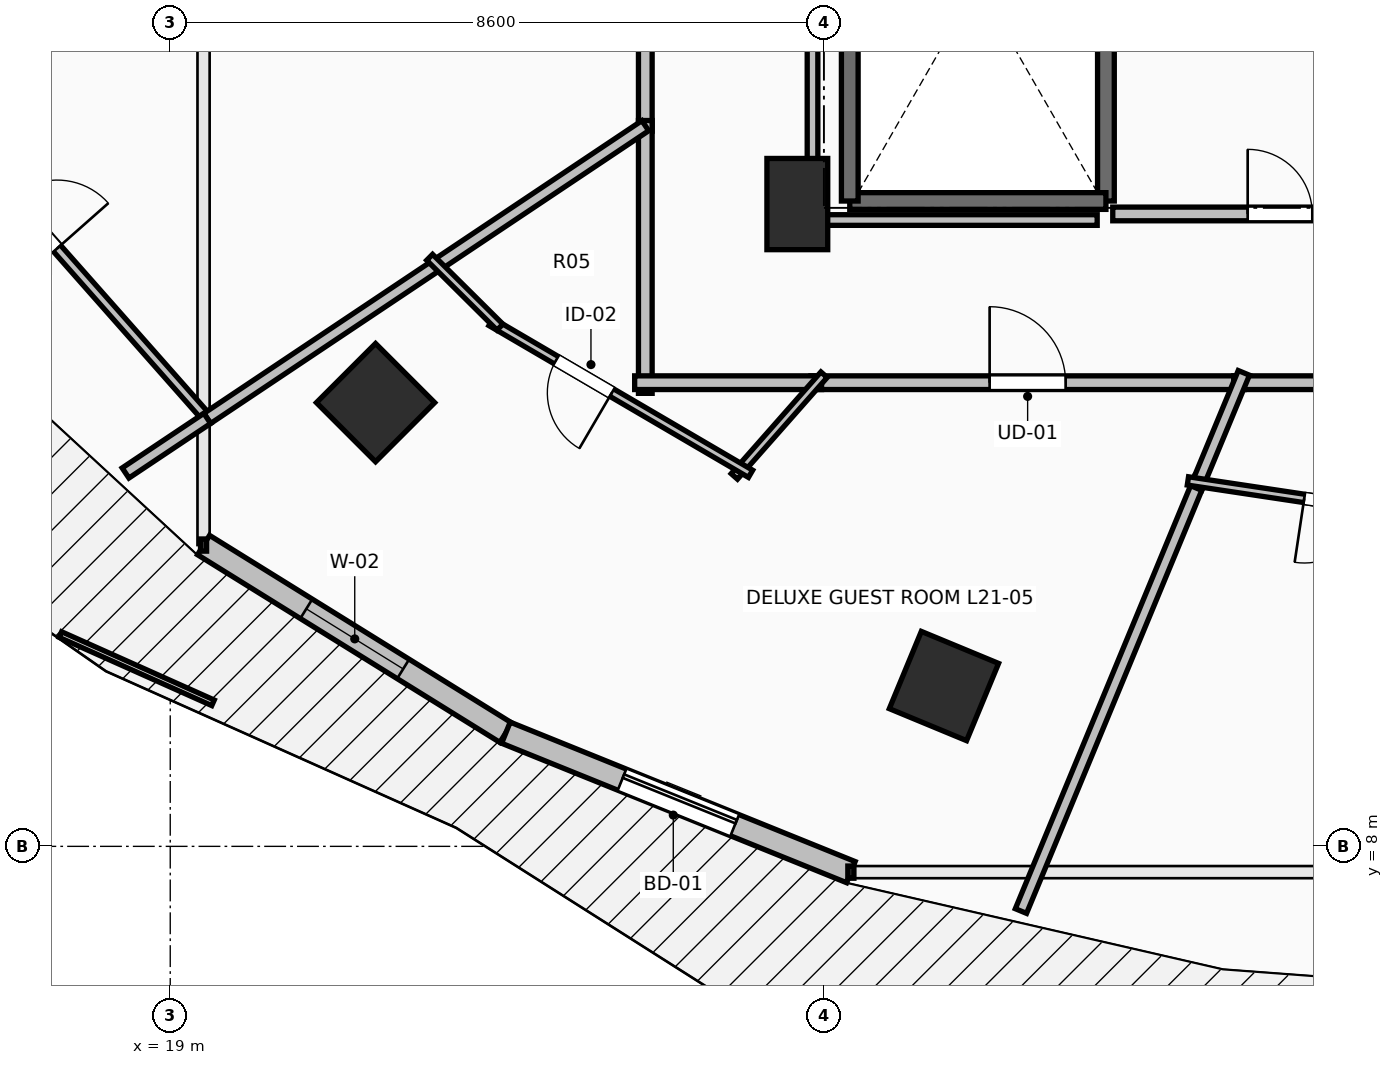
"""IFC4 building model, lengths in metres.
Left out: names, types, materials, properties, quantities, classifications, styles, units other than length and angle.
Written with IfcOpenShell. Run it as: python <this file> out.ifc"""

import sys

from ifc_helpers import new_model, si_unit, direction, frame, frame_2d, origin, origin_2d, place, context, subcontext, project, spatial, rectangle, extrude, element, fill, save


model = new_model("IFC4")
c1 = context("Model", 3, precision=1e-05, world=origin(), true_north=direction((0.0, 1.0)))
c2 = subcontext(c1, "Body", "Model", "MODEL_VIEW")
j1 = project(units=[si_unit("LENGTHUNIT", "METRE"), si_unit("PLANEANGLEUNIT", "RADIAN")], contexts=[c1])
p1 = place(None, origin())
s1 = spatial("IfcSite", under=j1, at=p1, CompositionType="ELEMENT")
p2 = place(p1, origin())
s2 = spatial("IfcBuilding", under=s1, at=p2, CompositionType="ELEMENT")
p3 = place(p2, frame((0.0, 0.0, 82.3)))
s3 = spatial("IfcBuildingStorey", under=s2, at=p3, CompositionType="ELEMENT", Elevation=82.3)
for number, where, z_axis, x_axis in (
    (1, (21.701, 13.838, 0.0), (0.0, 0.0, 1.0), (-0.707, -0.707, 0.0)),
    (2, (29.179, 10.109, 0.0), (0.0, 0.0, 1.0), (-0.383, -0.924, 0.0)),
):
    element("IfcColumn", number, at=place(p3, frame(where, z_axis=z_axis, x_axis=x_axis)), inside=s3, PredefinedType="COLUMN", context=c2, shape_type="SweptSolid", body=[
        extrude(rectangle(XDim=1.1, YDim=1.1, at=origin_2d()), origin(), (0.0, 0.0, 1.0), 3.5),
    ])
p4 = place(p3, frame((27.25, 16.45, 0.0), z_axis=(0.0, 0.0, 1.0), x_axis=(1.0, 0.0, 0.0)))
e3 = element("IfcColumn", 3, at=p4, inside=s3, PredefinedType="PILASTER", context=c2, shape_type="SweptSolid", body=[
    extrude(rectangle(XDim=0.8, YDim=1.2, at=origin_2d()), origin(), (0.0, 0.0, 1.0), 3.5),
])
p5 = place(p3, frame((19.438, 11.964, 0.0), z_axis=(0.0, 0.0, 1.0), x_axis=(0.849684479743, -0.527291461038, 0.0)))
e4 = element("IfcWall", 4, at=p5, inside=s3, PredefinedType="STANDARD", context=c2, shape_type="SweptSolid", body=[
    extrude(rectangle(XDim=4.681, YDim=0.3, at=frame_2d((2.341, 0.0))), origin(), (0.0, 0.0, 1.0), 3.24),
])
p6 = place(p5, frame((1.591, 0.0, 0.85)))
e5 = element("IfcOpeningElement", 5, at=p6, cuts=e4, PredefinedType="OPENING", context=c2, shape_type="SweptSolid", body=[
    extrude(rectangle(XDim=1.5, YDim=2.19, at=frame_2d((0.75, 1.095))), frame((0.0, 0.165, 0.0), z_axis=(0.0, -1.0, 0.0), x_axis=(1.0, 0.0, 0.0)), (0.0, 0.0, 1.0), 0.33),
])
p7 = place(p3, frame((23.416, 9.495, 0.0), z_axis=(0.0, 0.0, 1.0), x_axis=(0.927122233109, -0.374759075775, 0.0)))
e6 = element("IfcWall", 6, at=p7, inside=s3, PredefinedType="STANDARD", context=c2, shape_type="SweptSolid", body=[
    extrude(rectangle(XDim=4.895, YDim=0.3, at=frame_2d((2.448, 0.0))), origin(), (0.0, 0.0, 1.0), 3.24),
])
p8 = place(p7, frame((1.647, 0.0, 0.0)))
e7 = element("IfcOpeningElement", 7, at=p8, cuts=e6, PredefinedType="OPENING", context=c2, shape_type="SweptSolid", body=[
    extrude(rectangle(XDim=1.6, YDim=2.3, at=frame_2d((0.8, 1.15))), frame((0.0, 0.165, 0.0), z_axis=(0.0, -1.0, 0.0), x_axis=(1.0, 0.0, 0.0)), (0.0, 0.0, 1.0), 0.33),
])
p9 = place(p3, frame((31.31, 23.91, 0.0), z_axis=(0.0, 0.0, 1.0), x_axis=(0.0, -1.0, 0.0)))
e8 = element("IfcWall", 8, at=p9, inside=s3, PredefinedType="SOLIDWALL", context=c2, shape_type="SweptSolid", body=[
    extrude(rectangle(XDim=7.42, YDim=0.22, at=frame_2d((3.71, 0.0))), origin(), (0.0, 0.0, 1.0), 3.24),
])
p10 = place(p3, frame((31.31, 16.49, 0.0), z_axis=(0.0, 0.0, 1.0), x_axis=(-1.0, 0.0, 0.0)))
e9 = element("IfcWall", 9, at=p10, inside=s3, PredefinedType="SOLIDWALL", context=c2, shape_type="SweptSolid", body=[
    extrude(rectangle(XDim=3.37, YDim=0.22, at=frame_2d((1.685, 0.0))), origin(), (0.0, 0.0, 1.0), 3.24),
])
p11 = place(p3, frame((27.94, 16.49, 0.0), z_axis=(0.0, 0.0, 1.0), x_axis=(0.0, 1.0, 0.0)))
e10 = element("IfcWall", 10, at=p11, inside=s3, PredefinedType="SOLIDWALL", context=c2, shape_type="SweptSolid", body=[
    extrude(rectangle(XDim=7.42, YDim=0.22, at=frame_2d((3.71, 0.0))), origin(), (0.0, 0.0, 1.0), 3.24),
])
p12 = place(p3, frame((31.4, 16.32, 0.0), z_axis=(0.0, 0.0, 1.0), x_axis=(1.0, 0.0, 0.0)))
e11 = element("IfcWall", 11, at=p12, inside=s3, PredefinedType="PARTITIONING", context=c2, shape_type="SweptSolid", body=[
    extrude(rectangle(XDim=4.4, YDim=0.18, at=frame_2d((2.2, 0.0))), origin(), (0.0, 0.0, 1.0), 3.24),
])
p13 = place(p12, frame((1.775, 0.0, 0.0)))
e12 = element("IfcOpeningElement", 12, at=p13, cuts=e11, PredefinedType="OPENING", context=c2, shape_type="SweptSolid", body=[
    extrude(rectangle(XDim=0.85, YDim=2.1, at=frame_2d((0.425, 1.05))), frame((0.0, 0.105, 0.0), z_axis=(0.0, -1.0, 0.0), x_axis=(1.0, 0.0, 0.0)), (0.0, 0.0, 1.0), 0.21),
])
p14 = place(p3, frame((25.25, 24.754, 0.0), z_axis=(0.0, 0.0, 1.0), x_axis=(0.0, -1.0, 0.0)))
e13 = element("IfcWall", 13, at=p14, inside=s3, PredefinedType="PARTITIONING", context=c2, shape_type="SweptSolid", body=[
    extrude(rectangle(XDim=7.345, YDim=0.18, at=frame_2d((3.672, 0.0))), origin(), (0.0, 0.0, 1.0), 3.24),
])
p15 = place(p14, frame((3.147, 0.0, 0.0)))
e14 = element("IfcOpeningElement", 14, at=p15, cuts=e13, PredefinedType="OPENING", context=c2, shape_type="SweptSolid", body=[
    extrude(rectangle(XDim=1.05, YDim=2.2, at=frame_2d((0.525, 1.1))), frame((0.0, 0.105, 0.0), z_axis=(0.0, -1.0, 0.0), x_axis=(1.0, 0.0, 0.0)), (0.0, 0.0, 1.0), 0.21),
])
p16 = place(p3, frame((27.429, 14.1, 0.0), z_axis=(0.0, 0.0, 1.0), x_axis=(1.0, 0.0, 0.0)))
e15 = element("IfcWall", 15, at=p16, inside=s3, PredefinedType="PARTITIONING", context=c2, shape_type="SweptSolid", body=[
    extrude(rectangle(XDim=5.702, YDim=0.18, at=frame_2d((2.851, 0.0))), origin(), (0.0, 0.0, 1.0), 2.432),
])
p17 = place(p16, frame((2.351, 0.0, 0.0)))
e16 = element("IfcOpeningElement", 16, at=p17, cuts=e15, PredefinedType="OPENING", context=c2, shape_type="SweptSolid", body=[
    extrude(rectangle(XDim=1.0, YDim=2.15, at=frame_2d((0.5, 1.075))), frame((0.0, 0.105, 0.0), z_axis=(0.0, -1.0, 0.0), x_axis=(1.0, 0.0, 0.0)), (0.0, 0.0, 1.0), 0.21),
])
p18 = place(p3, frame((25.25, 17.549, 0.0), z_axis=(0.0, 0.0, 1.0), x_axis=(0.0, -1.0, 0.0)))
e17 = element("IfcWall", 17, at=p18, inside=s3, PredefinedType="PARTITIONING", context=c2, shape_type="SweptSolid", body=[
    extrude(rectangle(XDim=3.589, YDim=0.18, at=frame_2d((1.794, 0.0))), origin(), (0.0, 0.0, 1.0), 2.432),
])
p19 = place(p3, frame((25.11, 14.1, 0.0), z_axis=(0.0, 0.0, 1.0), x_axis=(1.0, 0.0, 0.0)))
e18 = element("IfcWall", 18, at=p19, inside=s3, PredefinedType="PARTITIONING", context=c2, shape_type="SweptSolid", body=[
    extrude(rectangle(XDim=2.459, YDim=0.18, at=frame_2d((1.229, 0.0))), origin(), (0.0, 0.0, 1.0), 2.874),
])
p20 = place(p3, frame((32.991, 14.1, 0.0), z_axis=(0.0, 0.0, 1.0), x_axis=(1.0, 0.0, 0.0)))
e19 = element("IfcWall", 19, at=p20, inside=s3, PredefinedType="PARTITIONING", context=c2, shape_type="SweptSolid", body=[
    extrude(rectangle(XDim=3.49, YDim=0.18, at=frame_2d((1.745, 0.0))), origin(), (0.0, 0.0, 1.0), 2.922),
])
p21 = place(p3, frame((14.94, 18.776, 0.0), z_axis=(0.0, 0.0, 1.0), x_axis=(0.662156478246, -0.749365597233, 0.0)))
e20 = element("IfcWall", 20, at=p21, inside=s3, PredefinedType="PARTITIONING", context=c2, shape_type="SweptSolid", body=[
    extrude(rectangle(XDim=6.867, YDim=0.125, at=frame_2d((3.434, 0.0))), origin(), (0.0, 0.0, 1.0), 3.24),
])
p22 = place(p21, frame((2.983, 0.0, 0.0)))
e21 = element("IfcOpeningElement", 21, at=p22, cuts=e20, PredefinedType="OPENING", context=c2, shape_type="SweptSolid", body=[
    extrude(rectangle(XDim=0.9, YDim=2.1, at=frame_2d((0.45, 1.05))), frame((0.0, 0.077, 0.0), z_axis=(0.0, -1.0, 0.0), x_axis=(1.0, 0.0, 0.0)), (0.0, 0.0, 1.0), 0.155),
])
p23 = place(p3, frame((19.487, 13.63, 0.0), z_axis=(0.0, 0.0, 1.0), x_axis=(0.831442874018, 0.555610247607, 0.0)))
e22 = element("IfcWall", 22, at=p23, inside=s3, PredefinedType="PARTITIONING", context=c2, shape_type="SweptSolid", body=[
    extrude(rectangle(XDim=6.931, YDim=0.16, at=frame_2d((3.466, 0.0))), origin(), (0.0, 0.0, 1.0), 2.432),
])
p24 = place(p3, frame((18.412, 12.912, 0.0), z_axis=(0.0, 0.0, 1.0), x_axis=(0.831643249848, 0.555310278118, 0.0)))
e23 = element("IfcWall", 23, at=p24, inside=s3, PredefinedType="PARTITIONING", context=c2, shape_type="SweptSolid", body=[
    extrude(rectangle(XDim=1.292, YDim=0.16, at=frame_2d((0.646, 0.0))), origin(), (0.0, 0.0, 1.0), 3.24),
])
p25 = place(p3, frame((27.602, 14.205, 0.0), z_axis=(0.0, 0.0, 1.0), x_axis=(-0.661454172329, -0.749985585134, 0.0)))
e24 = element("IfcWall", 24, at=p25, inside=s3, PredefinedType="PARTITIONING", context=c2, shape_type="SweptSolid", body=[
    extrude(rectangle(XDim=1.784, YDim=0.11, at=frame_2d((0.892, 0.0))), origin(), (0.0, 0.0, 1.0), 2.874),
])
p26 = place(p3, frame((26.635, 12.901, 0.0), z_axis=(0.0, 0.0, 1.0), x_axis=(-0.863173900656, 0.504906741117, 0.0)))
e25 = element("IfcWall", 25, at=p26, inside=s3, PredefinedType="PARTITIONING", context=c2, shape_type="SweptSolid", body=[
    extrude(rectangle(XDim=3.956, YDim=0.11, at=frame_2d((1.978, 0.0))), origin(), (0.0, 0.0, 1.0), 2.432),
])
p27 = place(p26, frame((2.113, 0.0, 0.0)))
e26 = element("IfcOpeningElement", 26, at=p27, cuts=e25, PredefinedType="OPENING", context=c2, shape_type="SweptSolid", body=[
    extrude(rectangle(XDim=0.85, YDim=2.1, at=frame_2d((0.425, 1.05))), frame((0.0, 0.07, 0.0), z_axis=(0.0, -1.0, 0.0), x_axis=(1.0, 0.0, 0.0)), (0.0, 0.0, 1.0), 0.14),
])
p28 = place(p3, frame((23.338, 14.831, 0.0), z_axis=(0.0, 0.0, 1.0), x_axis=(-0.709817225963, 0.70438590682, 0.0)))
e27 = element("IfcWall", 27, at=p28, inside=s3, PredefinedType="PARTITIONING", context=c2, shape_type="SweptSolid", body=[
    extrude(rectangle(XDim=1.303, YDim=0.11, at=frame_2d((0.652, 0.0))), origin(), (0.0, 0.0, 1.0), 2.432),
])
p29 = place(p3, frame((30.192, 7.149, 0.0), z_axis=(0.0, 0.0, 1.0), x_axis=(0.382705075352, 0.923870567395, 0.0)))
e28 = element("IfcWall", 28, at=p29, inside=s3, PredefinedType="PARTITIONING", context=c2, shape_type="SweptSolid", body=[
    extrude(rectangle(XDim=6.164, YDim=0.16, at=frame_2d((3.082, 0.0))), origin(), (0.0, 0.0, 1.0), 2.677),
])
p30 = place(p3, frame((32.497, 12.715, 0.0), z_axis=(0.0, 0.0, 1.0), x_axis=(0.382891039503, 0.923793511489, 0.0)))
e29 = element("IfcWall", 29, at=p30, inside=s3, PredefinedType="PARTITIONING", context=c2, shape_type="SweptSolid", body=[
    extrude(rectangle(XDim=1.639, YDim=0.16, at=frame_2d((0.82, 0.0))), origin(), (0.0, 0.0, 1.0), 2.922),
])
p31 = place(p3, frame((36.29, 12.221, 0.0), z_axis=(0.0, 0.0, 1.0), x_axis=(-0.988883185792, 0.148694468147, 0.0)))
e30 = element("IfcWall", 30, at=p31, inside=s3, PredefinedType="PARTITIONING", context=c2, shape_type="SweptSolid", body=[
    extrude(rectangle(XDim=3.946, YDim=0.11, at=frame_2d((1.973, 0.0))), origin(), (0.0, 0.0, 1.0), 3.24),
])
p32 = place(p31, frame((1.548, 0.0, 0.0)))
e31 = element("IfcOpeningElement", 31, at=p32, cuts=e30, PredefinedType="OPENING", context=c2, shape_type="SweptSolid", body=[
    extrude(rectangle(XDim=0.85, YDim=2.1, at=frame_2d((0.425, 1.05))), frame((0.0, 0.07, 0.0), z_axis=(0.0, -1.0, 0.0), x_axis=(1.0, 0.0, 0.0)), (0.0, 0.0, 1.0), 0.14),
])
p33 = place(p3, frame((31.195, 16.24, 0.0), z_axis=(0.0, 0.0, 1.0), x_axis=(-1.0, 0.0, 0.0)))
e32 = element("IfcWall", 32, at=p33, inside=s3, PredefinedType="PARTITIONING", context=c2, shape_type="SweptSolid", body=[
    extrude(rectangle(XDim=3.745, YDim=0.14, at=frame_2d((1.873, 0.0))), origin(), (0.0, 0.0, 1.0), 2.432),
])
p34 = place(p3, frame((27.45, 16.24, 0.0), z_axis=(0.0, 0.0, 1.0), x_axis=(0.0, 1.0, 0.0)))
e33 = element("IfcWall", 33, at=p34, inside=s3, PredefinedType="PARTITIONING", context=c2, shape_type="SweptSolid", body=[
    extrude(rectangle(XDim=7.514, YDim=0.14, at=frame_2d((3.757, 0.0))), origin(), (0.0, 0.0, 1.0), 2.432),
])
p35 = place(p8, origin())
e34 = element("IfcDoor", 34, at=p35, inside=s3, OperationType="SLIDING_TO_LEFT", PredefinedType="DOOR", context=c2, shape_type="SweptSolid", body=[
    extrude(rectangle(XDim=1.6, YDim=2.3, at=frame_2d((0.8, 1.15))), frame((0.0, 0.025, 0.0), z_axis=(0.0, -1.0, 0.0), x_axis=(1.0, 0.0, 0.0)), (0.0, 0.0, 1.0), 0.05),
])
fill(e7, e34)
p36 = place(p6, origin())
e35 = element("IfcWindow", 35, at=p36, inside=s3, PartitioningType="SINGLE_PANEL", PredefinedType="WINDOW", context=c2, shape_type="SweptSolid", body=[
    extrude(rectangle(XDim=1.5, YDim=2.19, at=frame_2d((0.75, 1.095))), frame((0.0, 0.03, 0.0), z_axis=(0.0, -1.0, 0.0), x_axis=(1.0, 0.0, 0.0)), (0.0, 0.0, 1.0), 0.06),
])
fill(e5, e35)
p37 = place(p13, origin())
e36 = element("IfcDoor", 36, at=p37, inside=s3, OperationType="SINGLE_SWING_LEFT", PredefinedType="DOOR", context=c2, shape_type="SweptSolid", body=[
    extrude(rectangle(XDim=0.85, YDim=2.1, at=frame_2d((0.425, 1.05))), frame((0.0, 0.025, 0.0), z_axis=(0.0, -1.0, 0.0), x_axis=(1.0, 0.0, 0.0)), (0.0, 0.0, 1.0), 0.05),
])
fill(e12, e36)
p38 = place(p17, origin())
e37 = element("IfcDoor", 37, at=p38, inside=s3, OperationType="SINGLE_SWING_LEFT", PredefinedType="DOOR", context=c2, shape_type="SweptSolid", body=[
    extrude(rectangle(XDim=1.0, YDim=2.15, at=frame_2d((0.5, 1.075))), frame((0.0, 0.025, 0.0), z_axis=(0.0, -1.0, 0.0), x_axis=(1.0, 0.0, 0.0)), (0.0, 0.0, 1.0), 0.05),
])
fill(e16, e37)
p39 = place(p22, origin())
e38 = element("IfcDoor", 38, at=p39, inside=s3, OperationType="SINGLE_SWING_RIGHT", PredefinedType="DOOR", context=c2, shape_type="SweptSolid", body=[
    extrude(rectangle(XDim=0.9, YDim=2.1, at=frame_2d((0.45, 1.05))), frame((0.0, 0.025, 0.0), z_axis=(0.0, -1.0, 0.0), x_axis=(1.0, 0.0, 0.0)), (0.0, 0.0, 1.0), 0.05),
])
fill(e21, e38)
p40 = place(p27, origin())
e39 = element("IfcDoor", 39, at=p40, inside=s3, OperationType="SINGLE_SWING_LEFT", PredefinedType="DOOR", context=c2, shape_type="SweptSolid", body=[
    extrude(rectangle(XDim=0.85, YDim=2.1, at=frame_2d((0.425, 1.05))), frame((0.0, 0.025, 0.0), z_axis=(0.0, -1.0, 0.0), x_axis=(1.0, 0.0, 0.0)), (0.0, 0.0, 1.0), 0.05),
])
fill(e26, e39)
p41 = place(p32, origin())
e40 = element("IfcDoor", 40, at=p41, inside=s3, OperationType="SINGLE_SWING_RIGHT", PredefinedType="DOOR", context=c2, shape_type="SweptSolid", body=[
    extrude(rectangle(XDim=0.85, YDim=2.1, at=frame_2d((0.425, 1.05))), frame((0.0, 0.025, 0.0), z_axis=(0.0, -1.0, 0.0), x_axis=(1.0, 0.0, 0.0)), (0.0, 0.0, 1.0), 0.05),
])
fill(e31, e40)
save(model, sys.argv[1])
